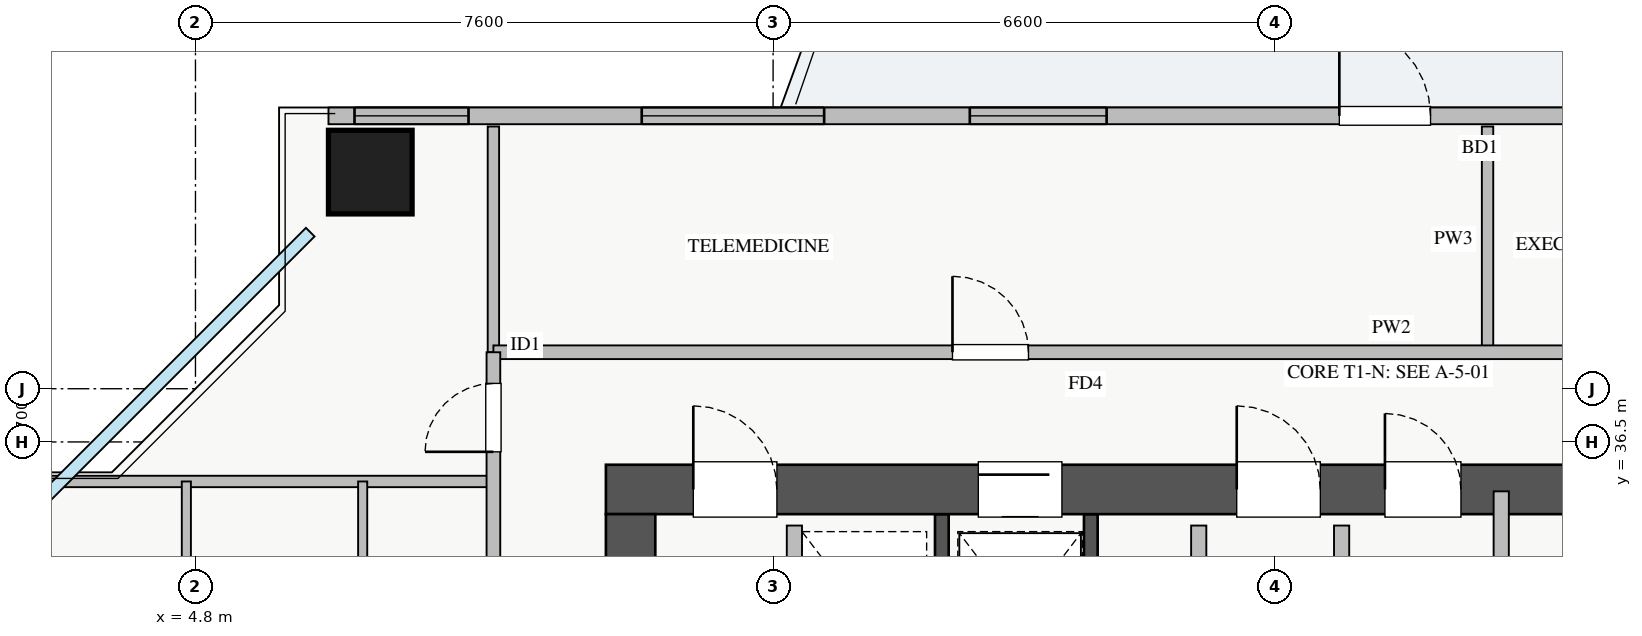
"""IFC4 building model, lengths in metres.
Left out: names, types, materials, properties, quantities, classifications, styles, units other than length and angle.
Written with IfcOpenShell. Run it as: python <this file> out.ifc"""

import sys

from ifc_helpers import new_model, si_unit, direction, frame, frame_2d, origin, origin_2d, place, context, subcontext, project, spatial, rectangle, extrude, source, transform, mapped, element, fill, save


model = new_model("IFC4")
c1 = context("Model", 3, precision=1e-05, world=origin(), true_north=direction((0.0, 1.0)))
c2 = subcontext(c1, "Body", "Model", "MODEL_VIEW")
j1 = project(units=[si_unit("LENGTHUNIT", "METRE"), si_unit("PLANEANGLEUNIT", "RADIAN")], contexts=[c1])
p1 = place(None, origin())
s1 = spatial("IfcSite", under=j1, at=p1, CompositionType="ELEMENT")
p2 = place(p1, origin())
s2 = spatial("IfcBuilding", under=s1, at=p2, CompositionType="ELEMENT")
p3 = place(p2, frame((0.0, 0.0, 129.5)))
s3 = spatial("IfcBuildingStorey", under=s2, at=p3, CompositionType="ELEMENT", Elevation=129.5)
for number, where, z_axis, x_axis in (
    (1, (14.62, 33.2, 0.0), (0.0, 0.0, 1.0), (0.0, 1.0, 0.0)),
    (2, (16.58, 33.2, 0.0), (0.0, 0.0, 1.0), (0.0, 1.0, 0.0)),
):
    element("IfcWall", number, at=place(p3, frame(where, z_axis=z_axis, x_axis=x_axis)), inside=s3, PredefinedType="SHEAR", context=c2, shape_type="SweptSolid", body=[
        extrude(rectangle(XDim=2.35, YDim=0.18, at=frame_2d((1.175, 0.0))), origin(), (0.0, 0.0, 1.0), 3.07),
    ])
p4 = place(p3, frame((10.2, 35.875, 0.0), z_axis=(0.0, 0.0, 1.0), x_axis=(1.0, 0.0, 0.0)))
e3 = element("IfcWall", 3, at=p4, inside=s3, PredefinedType="SHEAR", context=c2, shape_type="SweptSolid", body=[
    extrude(rectangle(XDim=17.6, YDim=0.65, at=frame_2d((8.8, 0.0))), origin(), (0.0, 0.0, 1.0), 3.25),
])
p5 = place(p4, frame((1.15, 0.0, 0.0)))
e4 = element("IfcOpeningElement", 4, at=p5, cuts=e3, PredefinedType="OPENING", context=c2, shape_type="SweptSolid", body=[
    extrude(rectangle(XDim=1.1, YDim=2.05, at=frame_2d((0.55, 1.025))), frame((0.0, 0.335, 0.0), z_axis=(0.0, -1.0, 0.0), x_axis=(1.0, 0.0, 0.0)), (0.0, 0.0, 1.0), 0.67),
])
p6 = place(p4, frame((8.3, 0.0, 0.0)))
e5 = element("IfcOpeningElement", 5, at=p6, cuts=e3, PredefinedType="OPENING", context=c2, shape_type="SweptSolid", body=[
    extrude(rectangle(XDim=1.1, YDim=2.05, at=frame_2d((0.55, 1.025))), frame((0.0, 0.335, 0.0), z_axis=(0.0, -1.0, 0.0), x_axis=(1.0, 0.0, 0.0)), (0.0, 0.0, 1.0), 0.67),
])
p7 = place(p4, frame((4.9, 0.0, 0.0)))
e6 = element("IfcOpeningElement", 6, at=p7, cuts=e3, PredefinedType="OPENING", context=c2, shape_type="SweptSolid", body=[
    extrude(rectangle(XDim=1.1, YDim=2.05, at=frame_2d((0.55, 1.025))), frame((0.0, 0.335, 0.0), z_axis=(0.0, -1.0, 0.0), x_axis=(1.0, 0.0, 0.0)), (0.0, 0.0, 1.0), 0.67),
])
p8 = place(p4, frame((14.74, 0.0, 0.0)))
e7 = element("IfcOpeningElement", 7, at=p8, cuts=e3, PredefinedType="OPENING", context=c2, shape_type="SweptSolid", body=[
    extrude(rectangle(XDim=1.0, YDim=2.05, at=frame_2d((0.5, 1.025))), frame((0.0, 0.335, 0.0), z_axis=(0.0, -1.0, 0.0), x_axis=(1.0, 0.0, 0.0)), (0.0, 0.0, 1.0), 0.67),
])
p9 = place(p4, frame((10.25, 0.0, 0.0)))
e8 = element("IfcOpeningElement", 8, at=p9, cuts=e3, PredefinedType="OPENING", context=c2, shape_type="SweptSolid", body=[
    extrude(rectangle(XDim=1.0, YDim=2.05, at=frame_2d((0.5, 1.025))), frame((0.0, 0.335, 0.0), z_axis=(0.0, -1.0, 0.0), x_axis=(1.0, 0.0, 0.0)), (0.0, 0.0, 1.0), 0.67),
])
p10 = place(p4, frame((12.7, 0.0, 0.0)))
e9 = element("IfcOpeningElement", 9, at=p10, cuts=e3, PredefinedType="OPENING", context=c2, shape_type="SweptSolid", body=[
    extrude(rectangle(XDim=1.0, YDim=2.05, at=frame_2d((0.5, 1.025))), frame((0.0, 0.335, 0.0), z_axis=(0.0, -1.0, 0.0), x_axis=(1.0, 0.0, 0.0)), (0.0, 0.0, 1.0), 0.67),
])
p11 = place(p3, frame((10.525, 29.65, 0.0), z_axis=(0.0, 0.0, 1.0), x_axis=(0.0, 1.0, 0.0)))
e10 = element("IfcWall", 10, at=p11, inside=s3, PredefinedType="SHEAR", context=c2, shape_type="SweptSolid", body=[
    extrude(rectangle(XDim=5.9, YDim=0.65, at=frame_2d((2.95, 0.0))), origin(), (0.0, 0.0, 1.0), 3.25),
])
m1 = source(origin(), c2, "Body", "SweptSolid", [
    extrude(rectangle(XDim=1.1, YDim=1.1, at=origin_2d()), origin(), (0.0, 0.0, 1.0), 3.25),
])
p12 = place(p3, frame((7.1, 40.05, 0.0), z_axis=(0.0, 0.0, 1.0), x_axis=(1.0, 0.0, 0.0)))
e11 = element("IfcColumn", 11, at=p12, inside=s3, PredefinedType="COLUMN", context=c2, shape_type="MappedRepresentation", body=[
    mapped(m1, transform((0.0, 0.0, 0.0), x_axis=(1.0, 0.0, 0.0), y_axis=(0.0, 1.0, 0.0), z_axis=(0.0, 0.0, 1.0), scale=1.0)),
])
p13 = place(p3, frame((6.55, 40.79, 0.0), z_axis=(0.0, 0.0, 1.0), x_axis=(1.0, 0.0, 0.0)))
e12 = element("IfcWall", 12, at=p13, inside=s3, PredefinedType="STANDARD", context=c2, shape_type="SweptSolid", body=[
    extrude(rectangle(XDim=24.9, YDim=0.22, at=frame_2d((12.45, 0.0))), origin(), (0.0, 0.0, 1.0), 2.61),
])
p14 = place(p13, frame((13.3, 0.0, 0.0)))
e13 = element("IfcOpeningElement", 13, at=p14, cuts=e12, PredefinedType="OPENING", context=c2, shape_type="SweptSolid", body=[
    extrude(rectangle(XDim=1.2, YDim=2.1, at=frame_2d((0.6, 1.05))), frame((0.0, 0.12, 0.0), z_axis=(0.0, -1.0, 0.0), x_axis=(1.0, 0.0, 0.0)), (0.0, 0.0, 1.0), 0.24),
])
p15 = place(p13, frame((0.343, 0.0, 0.9)))
e14 = element("IfcOpeningElement", 14, at=p15, cuts=e12, PredefinedType="OPENING", context=c2, shape_type="SweptSolid", body=[
    extrude(rectangle(XDim=1.5, YDim=1.5, at=frame_2d((0.75, 0.75))), frame((0.0, 0.12, 0.0), z_axis=(0.0, -1.0, 0.0), x_axis=(1.0, 0.0, 0.0)), (0.0, 0.0, 1.0), 0.24),
])
p16 = place(p13, frame((8.438, 0.0, 0.9)))
e15 = element("IfcOpeningElement", 15, at=p16, cuts=e12, PredefinedType="OPENING", context=c2, shape_type="SweptSolid", body=[
    extrude(rectangle(XDim=1.8, YDim=1.45, at=frame_2d((0.9, 0.725))), frame((0.0, 0.12, 0.0), z_axis=(0.0, -1.0, 0.0), x_axis=(1.0, 0.0, 0.0)), (0.0, 0.0, 1.0), 0.24),
])
p17 = place(p13, frame((17.261, 0.0, 0.9)))
e16 = element("IfcOpeningElement", 16, at=p17, cuts=e12, PredefinedType="OPENING", context=c2, shape_type="SweptSolid", body=[
    extrude(rectangle(XDim=1.5, YDim=1.5, at=frame_2d((0.75, 0.75))), frame((0.0, 0.12, 0.0), z_axis=(0.0, -1.0, 0.0), x_axis=(1.0, 0.0, 0.0)), (0.0, 0.0, 1.0), 0.24),
])
p18 = place(p13, frame((20.738, 0.0, 0.9)))
e17 = element("IfcOpeningElement", 17, at=p18, cuts=e12, PredefinedType="OPENING", context=c2, shape_type="SweptSolid", body=[
    extrude(rectangle(XDim=2.1, YDim=1.48, at=frame_2d((1.05, 0.74))), frame((0.0, 0.12, 0.0), z_axis=(0.0, -1.0, 0.0), x_axis=(1.0, 0.0, 0.0)), (0.0, 0.0, 1.0), 0.24),
])
p19 = place(p13, frame((4.122, 0.0, 0.9)))
e18 = element("IfcOpeningElement", 18, at=p19, cuts=e12, PredefinedType="OPENING", context=c2, shape_type="SweptSolid", body=[
    extrude(rectangle(XDim=2.4, YDim=1.5, at=frame_2d((1.2, 0.75))), frame((0.0, 0.12, 0.0), z_axis=(0.0, -1.0, 0.0), x_axis=(1.0, 0.0, 0.0)), (0.0, 0.0, 1.0), 0.24),
])
for number, where, z_axis, x_axis in (
    (19, (12.68, 33.19, 0.0), (0.0, 0.0, 1.0), (0.0, 1.0, 0.0)),
    (20, (18.0, 33.19, 0.0), (0.0, 0.0, 1.0), (0.0, 1.0, 0.0)),
    (21, (19.88, 33.19, 0.0), (0.0, 0.0, 1.0), (0.0, 1.0, 0.0)),
):
    element("IfcWall", number, at=place(p3, frame(where, z_axis=z_axis, x_axis=x_axis)), inside=s3, PredefinedType="PARTITIONING", context=c2, shape_type="SweptSolid", body=[
        extrude(rectangle(XDim=2.21, YDim=0.2, at=frame_2d((1.105, 0.0))), origin(), (0.0, 0.0, 1.0), 3.07),
    ])
p20 = place(p3, frame((21.98, 33.2, 0.0), z_axis=(0.0, 0.0, 1.0), x_axis=(0.0, 1.0, 0.0)))
e22 = element("IfcWall", 22, at=p20, inside=s3, PredefinedType="PARTITIONING", context=c2, shape_type="SweptSolid", body=[
    extrude(rectangle(XDim=2.65, YDim=0.2, at=frame_2d((1.325, 0.0))), origin(), (0.0, 0.0, 1.0), 3.07),
])
for number, where, z_axis, x_axis in (
    (23, (21.8, 37.68, 0.0), (0.0, 0.0, 1.0), (0.0, 1.0, 0.0)),
    (24, (8.72, 37.68, 0.0), (0.0, 0.0, 1.0), (0.0, 1.0, 0.0)),
):
    element("IfcWall", number, at=place(p3, frame(where, z_axis=z_axis, x_axis=x_axis)), inside=s3, PredefinedType="PARTITIONING", context=c2, shape_type="SweptSolid", body=[
        extrude(rectangle(XDim=2.97, YDim=0.15, at=frame_2d((1.485, 0.0))), origin(), (0.0, 0.0, 1.0), 3.07),
    ])
p21 = place(p3, frame((8.72, 37.68, 0.0), z_axis=(0.0, 0.0, 1.0), x_axis=(1.0, 0.0, 0.0)))
e25 = element("IfcWall", 25, at=p21, inside=s3, PredefinedType="PARTITIONING", context=c2, shape_type="SweptSolid", body=[
    extrude(rectangle(XDim=23.63, YDim=0.18, at=frame_2d((11.815, 0.0))), origin(), (0.0, 0.0, 1.0), 3.07),
])
p22 = place(p21, frame((6.04, 0.0, 0.0)))
e26 = element("IfcOpeningElement", 26, at=p22, cuts=e25, PredefinedType="OPENING", context=c2, shape_type="SweptSolid", body=[
    extrude(rectangle(XDim=1.0, YDim=2.05, at=frame_2d((0.5, 1.025))), frame((0.0, 0.1, 0.0), z_axis=(0.0, -1.0, 0.0), x_axis=(1.0, 0.0, 0.0)), (0.0, 0.0, 1.0), 0.2),
])
p23 = place(p21, frame((17.67, 0.0, 0.0)))
e27 = element("IfcOpeningElement", 27, at=p23, cuts=e25, PredefinedType="OPENING", context=c2, shape_type="SweptSolid", body=[
    extrude(rectangle(XDim=1.0, YDim=2.05, at=frame_2d((0.5, 1.025))), frame((0.0, 0.1, 0.0), z_axis=(0.0, -1.0, 0.0), x_axis=(1.0, 0.0, 0.0)), (0.0, 0.0, 1.0), 0.2),
])
p24 = place(p3, frame((1.35, 35.98, 0.0), z_axis=(0.0, 0.0, 1.0), x_axis=(1.0, 0.0, 0.0)))
e28 = element("IfcWall", 28, at=p24, inside=s3, PredefinedType="PARTITIONING", context=c2, shape_type="SweptSolid", body=[
    extrude(rectangle(XDim=7.37, YDim=0.15, at=frame_2d((3.685, 0.0))), origin(), (0.0, 0.0, 1.0), 3.07),
])
p25 = place(p3, frame((4.68, 31.42, 0.0), z_axis=(0.0, 0.0, 1.0), x_axis=(0.0, 1.0, 0.0)))
e29 = element("IfcWall", 29, at=p25, inside=s3, PredefinedType="PLUMBINGWALL", context=c2, shape_type="SweptSolid", body=[
    extrude(rectangle(XDim=4.56, YDim=0.12, at=frame_2d((2.28, 0.0))), origin(), (0.0, 0.0, 1.0), 3.07),
])
p26 = place(p3, frame((7.0, 31.42, 0.0), z_axis=(0.0, 0.0, 1.0), x_axis=(0.0, 1.0, 0.0)))
e30 = element("IfcWall", 30, at=p26, inside=s3, PredefinedType="PLUMBINGWALL", context=c2, shape_type="SweptSolid", body=[
    extrude(rectangle(XDim=4.56, YDim=0.12, at=frame_2d((2.28, 0.0))), origin(), (0.0, 0.0, 1.0), 2.577),
])
p27 = place(p3, frame((8.72, 8.31, 0.0), z_axis=(0.0, 0.0, 1.0), x_axis=(0.0, 1.0, 0.0)))
e31 = element("IfcWall", 31, at=p27, inside=s3, PredefinedType="PARTITIONING", context=c2, shape_type="SweptSolid", body=[
    extrude(rectangle(XDim=29.37, YDim=0.18, at=frame_2d((14.685, 0.0))), origin(), (0.0, 0.0, 1.0), 3.07),
])
p28 = place(p27, frame((28.06, 0.0, 0.0)))
e32 = element("IfcOpeningElement", 32, at=p28, cuts=e31, PredefinedType="OPENING", context=c2, shape_type="SweptSolid", body=[
    extrude(rectangle(XDim=0.9, YDim=2.05, at=frame_2d((0.45, 1.025))), frame((0.0, 0.1, 0.0), z_axis=(0.0, -1.0, 0.0), x_axis=(1.0, 0.0, 0.0)), (0.0, 0.0, 1.0), 0.2),
])
p29 = place(p27, frame((0.24, 0.0, 0.0)))
e33 = element("IfcOpeningElement", 33, at=p29, cuts=e31, PredefinedType="OPENING", context=c2, shape_type="SweptSolid", body=[
    extrude(rectangle(XDim=0.9, YDim=2.05, at=frame_2d((0.45, 1.025))), frame((0.0, 0.1, 0.0), z_axis=(0.0, -1.0, 0.0), x_axis=(1.0, 0.0, 0.0)), (0.0, 0.0, 1.0), 0.2),
])
p30 = place(p27, frame((2.92, 0.0, 0.0)))
e34 = element("IfcOpeningElement", 34, at=p30, cuts=e31, PredefinedType="OPENING", context=c2, shape_type="SweptSolid", body=[
    extrude(rectangle(XDim=1.0, YDim=2.05, at=frame_2d((0.5, 1.025))), frame((0.0, 0.1, 0.0), z_axis=(0.0, -1.0, 0.0), x_axis=(1.0, 0.0, 0.0)), (0.0, 0.0, 1.0), 0.2),
])
p31 = place(p27, frame((14.315, 0.0, 0.0)))
e35 = element("IfcOpeningElement", 35, at=p31, cuts=e31, PredefinedType="OPENING", context=c2, shape_type="SweptSolid", body=[
    extrude(rectangle(XDim=1.0, YDim=2.05, at=frame_2d((0.5, 1.025))), frame((0.0, 0.1, 0.0), z_axis=(0.0, -1.0, 0.0), x_axis=(1.0, 0.0, 0.0)), (0.0, 0.0, 1.0), 0.2),
])
p32 = place(p27, frame((20.315, 0.0, 0.0)))
e36 = element("IfcOpeningElement", 36, at=p32, cuts=e31, PredefinedType="OPENING", context=c2, shape_type="SweptSolid", body=[
    extrude(rectangle(XDim=1.0, YDim=2.05, at=frame_2d((0.5, 1.025))), frame((0.0, 0.1, 0.0), z_axis=(0.0, -1.0, 0.0), x_axis=(1.0, 0.0, 0.0)), (0.0, 0.0, 1.0), 0.2),
])
m2 = source(origin(), c2, "Body", "SweptSolid", [
    extrude(rectangle(XDim=1.2, YDim=2.1, at=frame_2d((0.6, 1.05))), frame((0.0, 0.025, 0.0), z_axis=(0.0, -1.0, 0.0), x_axis=(1.0, 0.0, 0.0)), (0.0, 0.0, 1.0), 0.05),
])
p33 = place(p14, origin())
e37 = element("IfcDoor", 37, at=p33, inside=s3, OperationType="SINGLE_SWING_LEFT", PredefinedType="DOOR", context=c2, shape_type="MappedRepresentation", body=[
    mapped(m2, transform((0.0, 0.0, 0.0), x_axis=(1.0, 0.0, 0.0), y_axis=(0.0, 1.0, 0.0), z_axis=(0.0, 0.0, 1.0), scale=1.0)),
])
fill(e13, e37)
m3 = source(origin(), c2, "Body", "SweptSolid", [
    extrude(rectangle(XDim=1.5, YDim=1.5, at=frame_2d((0.75, 0.75))), frame((0.0, 0.03, 0.0), z_axis=(0.0, -1.0, 0.0), x_axis=(1.0, 0.0, 0.0)), (0.0, 0.0, 1.0), 0.06),
])
p34 = place(p15, origin())
e38 = element("IfcWindow", 38, at=p34, inside=s3, PartitioningType="TRIPLE_PANEL_VERTICAL", PredefinedType="WINDOW", context=c2, shape_type="MappedRepresentation", body=[
    mapped(m3, transform((0.0, 0.0, 0.0), x_axis=(1.0, 0.0, 0.0), y_axis=(0.0, 1.0, 0.0), z_axis=(0.0, 0.0, 1.0), scale=1.0)),
])
fill(e14, e38)
m4 = source(origin(), c2, "Body", "SweptSolid", [
    extrude(rectangle(XDim=1.8, YDim=1.45, at=frame_2d((0.9, 0.725))), frame((0.0, 0.03, 0.0), z_axis=(0.0, -1.0, 0.0), x_axis=(1.0, 0.0, 0.0)), (0.0, 0.0, 1.0), 0.06),
])
p35 = place(p16, origin())
e39 = element("IfcWindow", 39, at=p35, inside=s3, PartitioningType="DOUBLE_PANEL_VERTICAL", PredefinedType="WINDOW", context=c2, shape_type="MappedRepresentation", body=[
    mapped(m4, transform((0.0, 0.0, 0.0), x_axis=(1.0, 0.0, 0.0), y_axis=(0.0, 1.0, 0.0), z_axis=(0.0, 0.0, 1.0), scale=1.0)),
])
fill(e15, e39)
m5 = source(origin(), c2, "Body", "SweptSolid", [
    extrude(rectangle(XDim=1.1, YDim=2.05, at=frame_2d((0.55, 1.025))), frame((0.0, 0.025, 0.0), z_axis=(0.0, -1.0, 0.0), x_axis=(1.0, 0.0, 0.0)), (0.0, 0.0, 1.0), 0.05),
])
p36 = place(p5, origin())
e40 = element("IfcDoor", 40, at=p36, inside=s3, OperationType="SINGLE_SWING_LEFT", PredefinedType="DOOR", context=c2, shape_type="MappedRepresentation", body=[
    mapped(m5, transform((0.0, 0.0, 0.0), x_axis=(1.0, 0.0, 0.0), y_axis=(0.0, 1.0, 0.0), z_axis=(0.0, 0.0, 1.0), scale=1.0)),
])
fill(e4, e40)
p37 = place(p6, origin())
e41 = element("IfcDoor", 41, at=p37, inside=s3, OperationType="SINGLE_SWING_LEFT", PredefinedType="DOOR", context=c2, shape_type="MappedRepresentation", body=[
    mapped(m5, transform((0.0, 0.0, 0.0), x_axis=(1.0, 0.0, 0.0), y_axis=(0.0, 1.0, 0.0), z_axis=(0.0, 0.0, 1.0), scale=1.0)),
])
fill(e5, e41)
p38 = place(p7, origin())
e42 = element("IfcDoor", 42, at=p38, inside=s3, OperationType="SLIDING_TO_LEFT", PredefinedType="DOOR", context=c2, shape_type="MappedRepresentation", body=[
    mapped(m5, transform((0.0, 0.0, 0.0), x_axis=(1.0, 0.0, 0.0), y_axis=(0.0, 1.0, 0.0), z_axis=(0.0, 0.0, 1.0), scale=1.0)),
])
fill(e6, e42)
m6 = source(origin(), c2, "Body", "SweptSolid", [
    extrude(rectangle(XDim=1.0, YDim=2.05, at=frame_2d((0.5, 1.025))), frame((0.0, 0.025, 0.0), z_axis=(0.0, -1.0, 0.0), x_axis=(1.0, 0.0, 0.0)), (0.0, 0.0, 1.0), 0.05),
])
p39 = place(p9, origin())
e43 = element("IfcDoor", 43, at=p39, inside=s3, OperationType="SINGLE_SWING_LEFT", PredefinedType="DOOR", context=c2, shape_type="MappedRepresentation", body=[
    mapped(m6, transform((0.0, 0.0, 0.0), x_axis=(1.0, 0.0, 0.0), y_axis=(0.0, 1.0, 0.0), z_axis=(0.0, 0.0, 1.0), scale=1.0)),
])
fill(e8, e43)
p40 = place(p22, origin())
e44 = element("IfcDoor", 44, at=p40, inside=s3, OperationType="SINGLE_SWING_LEFT", PredefinedType="DOOR", context=c2, shape_type="MappedRepresentation", body=[
    mapped(m6, transform((0.0, 0.0, 0.0), x_axis=(1.0, 0.0, 0.0), y_axis=(0.0, 1.0, 0.0), z_axis=(0.0, 0.0, 1.0), scale=1.0)),
])
fill(e26, e44)
m7 = source(origin(), c2, "Body", "SweptSolid", [
    extrude(rectangle(XDim=0.9, YDim=2.05, at=frame_2d((0.45, 1.025))), frame((0.0, 0.025, 0.0), z_axis=(0.0, -1.0, 0.0), x_axis=(1.0, 0.0, 0.0)), (0.0, 0.0, 1.0), 0.05),
])
p41 = place(p28, origin())
e45 = element("IfcDoor", 45, at=p41, inside=s3, OperationType="SINGLE_SWING_LEFT", PredefinedType="DOOR", context=c2, shape_type="MappedRepresentation", body=[
    mapped(m7, transform((0.0, 0.0, 0.0), x_axis=(1.0, 0.0, 0.0), y_axis=(0.0, 1.0, 0.0), z_axis=(0.0, 0.0, 1.0), scale=1.0)),
])
fill(e32, e45)
m8 = source(origin(), c2, "Body", "SweptSolid", [
    extrude(rectangle(XDim=2.4, YDim=1.5, at=frame_2d((1.2, 0.75))), frame((0.0, 0.03, 0.0), z_axis=(0.0, -1.0, 0.0), x_axis=(1.0, 0.0, 0.0)), (0.0, 0.0, 1.0), 0.06),
])
p42 = place(p19, origin())
e46 = element("IfcWindow", 46, at=p42, inside=s3, PartitioningType="TRIPLE_PANEL_VERTICAL", PredefinedType="WINDOW", context=c2, shape_type="MappedRepresentation", body=[
    mapped(m8, transform((0.0, 0.0, 0.0), x_axis=(1.0, 0.0, 0.0), y_axis=(0.0, 1.0, 0.0), z_axis=(0.0, 0.0, 1.0), scale=1.0)),
])
fill(e18, e46)
save(model, sys.argv[1])
